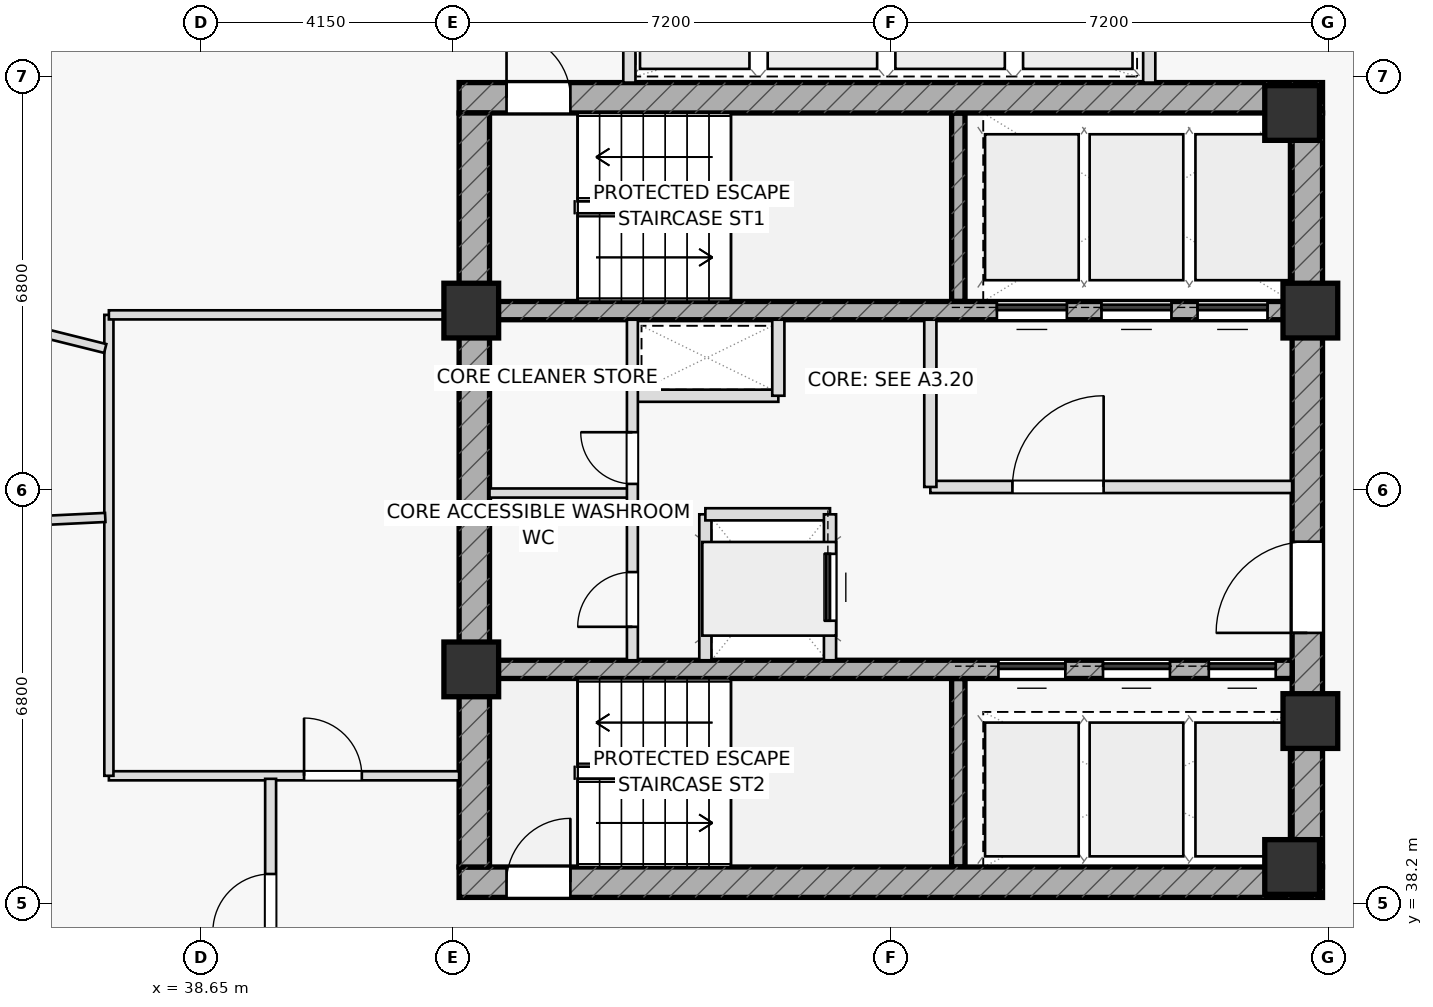
"""IFC4 building model, lengths in metres.
Left out: names, types, materials, properties, quantities, classifications, styles, units other than length and angle.
Written with IfcOpenShell. Run it as: python <this file> out.ifc"""

import sys

from ifc_helpers import new_model, si_unit, direction, frame, frame_2d, origin, origin_2d, place, context, subcontext, project, spatial, rectangle, extrude, element, fill, save


model = new_model("IFC4")
c1 = context("Model", 3, precision=1e-05, world=origin(), true_north=direction((0.0, 1.0)))
c2 = subcontext(c1, "Body", "Model", "MODEL_VIEW")
j1 = project(units=[si_unit("LENGTHUNIT", "METRE"), si_unit("PLANEANGLEUNIT", "RADIAN")], contexts=[c1])
p1 = place(None, origin())
s1 = spatial("IfcSite", under=j1, at=p1, CompositionType="ELEMENT")
p2 = place(p1, origin())
s2 = spatial("IfcBuilding", under=s1, at=p2, CompositionType="ELEMENT")
p3 = place(p2, frame((0.0, 0.0, 216.95)))
s3 = spatial("IfcBuildingStorey", under=s2, at=p3, CompositionType="ELEMENT", Elevation=216.95)
for number, where, z_axis, x_axis in (
    (1, (51.11, 48.1, 0.0), (0.0, 0.0, 1.0), (0.0, 1.0, 0.0)),
    (2, (51.11, 38.8, 0.0), (0.0, 0.0, 1.0), (0.0, 1.0, 0.0)),
):
    element("IfcWall", number, at=place(p3, frame(where, z_axis=z_axis, x_axis=x_axis)), inside=s3, PredefinedType="SHEAR", context=c2, shape_type="SweptSolid", body=[
        extrude(rectangle(XDim=3.1, YDim=0.22, at=frame_2d((1.55, 0.0))), origin(), (0.0, 0.0, 1.0), 4.9),
    ])
p4 = place(p3, frame((42.9, 51.45, 0.0), z_axis=(0.0, 0.0, 1.0), x_axis=(1.0, 0.0, 0.0)))
e3 = element("IfcWall", 3, at=p4, inside=s3, PredefinedType="SHEAR", context=c2, shape_type="SweptSolid", body=[
    extrude(rectangle(XDim=14.2, YDim=0.5, at=frame_2d((7.1, 0.0))), origin(), (0.0, 0.0, 1.0), 4.9),
])
p5 = place(p4, frame((0.78, 0.0, 0.0)))
e4 = element("IfcOpeningElement", 4, at=p5, cuts=e3, PredefinedType="OPENING", context=c2, shape_type="SweptSolid", body=[
    extrude(rectangle(XDim=1.05, YDim=2.2, at=frame_2d((0.525, 1.1))), frame((0.0, 0.26, 0.0), z_axis=(0.0, -1.0, 0.0), x_axis=(1.0, 0.0, 0.0)), (0.0, 0.0, 1.0), 0.52),
])
p6 = place(p3, frame((42.9, 38.55, 0.0), z_axis=(0.0, 0.0, 1.0), x_axis=(1.0, 0.0, 0.0)))
e5 = element("IfcWall", 5, at=p6, inside=s3, PredefinedType="SHEAR", context=c2, shape_type="SweptSolid", body=[
    extrude(rectangle(XDim=14.2, YDim=0.5, at=frame_2d((7.1, 0.0))), origin(), (0.0, 0.0, 1.0), 4.9),
])
p7 = place(p6, frame((0.78, 0.0, 0.0)))
e6 = element("IfcOpeningElement", 6, at=p7, cuts=e5, PredefinedType="OPENING", context=c2, shape_type="SweptSolid", body=[
    extrude(rectangle(XDim=1.05, YDim=2.2, at=frame_2d((0.525, 1.1))), frame((0.0, 0.26, 0.0), z_axis=(0.0, -1.0, 0.0), x_axis=(1.0, 0.0, 0.0)), (0.0, 0.0, 1.0), 0.52),
])
p8 = place(p3, frame((43.15, 38.8, 0.0), z_axis=(0.0, 0.0, 1.0), x_axis=(0.0, 1.0, 0.0)))
e7 = element("IfcWall", 7, at=p8, inside=s3, PredefinedType="SHEAR", context=c2, shape_type="SweptSolid", body=[
    extrude(rectangle(XDim=12.4, YDim=0.5, at=frame_2d((6.2, 0.0))), origin(), (0.0, 0.0, 1.0), 4.9),
])
p9 = place(p3, frame((56.85, 38.8, 0.0), z_axis=(0.0, 0.0, 1.0), x_axis=(0.0, 1.0, 0.0)))
e8 = element("IfcWall", 8, at=p9, inside=s3, PredefinedType="SHEAR", context=c2, shape_type="SweptSolid", body=[
    extrude(rectangle(XDim=12.4, YDim=0.5, at=frame_2d((6.2, 0.0))), origin(), (0.0, 0.0, 1.0), 4.9),
])
p10 = place(p9, frame((3.85, 0.0, 0.0)))
e9 = element("IfcOpeningElement", 9, at=p10, cuts=e8, PredefinedType="OPENING", context=c2, shape_type="SweptSolid", body=[
    extrude(rectangle(XDim=1.5, YDim=2.2, at=frame_2d((0.75, 1.1))), frame((0.0, 0.26, 0.0), z_axis=(0.0, -1.0, 0.0), x_axis=(1.0, 0.0, 0.0)), (0.0, 0.0, 1.0), 0.52),
])
p11 = place(p3, frame((43.4, 47.95, 0.0), z_axis=(0.0, 0.0, 1.0), x_axis=(1.0, 0.0, 0.0)))
e10 = element("IfcWall", 10, at=p11, inside=s3, PredefinedType="SHEAR", context=c2, shape_type="SweptSolid", body=[
    extrude(rectangle(XDim=13.2, YDim=0.3, at=frame_2d((6.6, 0.0))), origin(), (0.0, 0.0, 1.0), 4.9),
])
p12 = place(p11, frame((8.345, 0.0, 0.0)))
e11 = element("IfcOpeningElement", 11, at=p12, cuts=e10, PredefinedType="OPENING", context=c2, shape_type="SweptSolid", body=[
    extrude(rectangle(XDim=1.15, YDim=2.2, at=frame_2d((0.575, 1.1))), frame((0.0, 0.16, 0.0), z_axis=(0.0, -1.0, 0.0), x_axis=(1.0, 0.0, 0.0)), (0.0, 0.0, 1.0), 0.32),
])
p13 = place(p11, frame((10.065, 0.0, 0.0)))
e12 = element("IfcOpeningElement", 12, at=p13, cuts=e10, PredefinedType="OPENING", context=c2, shape_type="SweptSolid", body=[
    extrude(rectangle(XDim=1.15, YDim=2.2, at=frame_2d((0.575, 1.1))), frame((0.0, 0.16, 0.0), z_axis=(0.0, -1.0, 0.0), x_axis=(1.0, 0.0, 0.0)), (0.0, 0.0, 1.0), 0.32),
])
p14 = place(p11, frame((11.645, 0.0, 0.0)))
e13 = element("IfcOpeningElement", 13, at=p14, cuts=e10, PredefinedType="OPENING", context=c2, shape_type="SweptSolid", body=[
    extrude(rectangle(XDim=1.15, YDim=2.2, at=frame_2d((0.575, 1.1))), frame((0.0, 0.16, 0.0), z_axis=(0.0, -1.0, 0.0), x_axis=(1.0, 0.0, 0.0)), (0.0, 0.0, 1.0), 0.32),
])
p15 = place(p3, frame((43.4, 42.05, 0.0), z_axis=(0.0, 0.0, 1.0), x_axis=(1.0, 0.0, 0.0)))
e14 = element("IfcWall", 14, at=p15, inside=s3, PredefinedType="SHEAR", context=c2, shape_type="SweptSolid", body=[
    extrude(rectangle(XDim=13.2, YDim=0.3, at=frame_2d((6.6, 0.0))), origin(), (0.0, 0.0, 1.0), 4.9),
])
p16 = place(p15, frame((8.37, 0.0, 0.0)))
e15 = element("IfcOpeningElement", 15, at=p16, cuts=e14, PredefinedType="OPENING", context=c2, shape_type="SweptSolid", body=[
    extrude(rectangle(XDim=1.1, YDim=2.15, at=frame_2d((0.55, 1.075))), frame((0.0, 0.16, 0.0), z_axis=(0.0, -1.0, 0.0), x_axis=(1.0, 0.0, 0.0)), (0.0, 0.0, 1.0), 0.32),
])
p17 = place(p15, frame((10.09, 0.0, 0.0)))
e16 = element("IfcOpeningElement", 16, at=p17, cuts=e14, PredefinedType="OPENING", context=c2, shape_type="SweptSolid", body=[
    extrude(rectangle(XDim=1.1, YDim=2.15, at=frame_2d((0.55, 1.075))), frame((0.0, 0.16, 0.0), z_axis=(0.0, -1.0, 0.0), x_axis=(1.0, 0.0, 0.0)), (0.0, 0.0, 1.0), 0.32),
])
p18 = place(p15, frame((11.83, 0.0, 0.0)))
e17 = element("IfcOpeningElement", 17, at=p18, cuts=e14, PredefinedType="OPENING", context=c2, shape_type="SweptSolid", body=[
    extrude(rectangle(XDim=1.1, YDim=2.15, at=frame_2d((0.55, 1.075))), frame((0.0, 0.16, 0.0), z_axis=(0.0, -1.0, 0.0), x_axis=(1.0, 0.0, 0.0)), (0.0, 0.0, 1.0), 0.32),
])
for number, where, z_axis, x_axis in (
    (18, (43.1, 47.95, 0.0), (0.0, 0.0, 1.0), (1.0, 0.0, 0.0)),
    (19, (56.9, 47.95, 0.0), (0.0, 0.0, 1.0), (1.0, 0.0, 0.0)),
    (20, (56.6, 51.2, 0.0), (0.0, 0.0, 1.0), (1.0, 0.0, 0.0)),
    (21, (43.1, 42.05, 0.0), (0.0, 0.0, 1.0), (1.0, 0.0, 0.0)),
    (22, (56.9, 41.2, 0.0), (0.0, 0.0, 1.0), (1.0, 0.0, 0.0)),
    (23, (56.6, 38.8, 0.0), (0.0, 0.0, 1.0), (1.0, 0.0, 0.0)),
):
    element("IfcColumn", number, at=place(p3, frame(where, z_axis=z_axis, x_axis=x_axis)), inside=s3, PredefinedType="COLUMN", context=c2, shape_type="SweptSolid", body=[
        extrude(rectangle(XDim=0.9, YDim=0.9, at=origin_2d()), origin(), (0.0, 0.0, 1.0), 4.9),
    ])
for number, where, z_axis, x_axis in (
    (24, (45.7, 51.7, 0.0), (0.0, 0.0, 1.0), (0.0, 1.0, 0.0)),
    (25, (54.25, 51.7, 0.0), (0.0, 0.0, 1.0), (0.0, 1.0, 0.0)),
):
    element("IfcWall", number, at=place(p3, frame(where, z_axis=z_axis, x_axis=x_axis)), inside=s3, PredefinedType="PARTITIONING", context=c2, shape_type="SweptSolid", body=[
        extrude(rectangle(XDim=2.6, YDim=0.2, at=frame_2d((1.3, 0.0))), origin(), (0.0, 0.0, 1.0), 4.9),
    ])
p19 = place(p3, frame((45.75, 46.55, 0.0), z_axis=(0.0, 0.0, 1.0), x_axis=(1.0, 0.0, 0.0)))
e26 = element("IfcWall", 26, at=p19, inside=s3, PredefinedType="PARTITIONING", context=c2, shape_type="SweptSolid", body=[
    extrude(rectangle(XDim=2.4, YDim=0.2, at=frame_2d((1.2, 0.0))), origin(), (0.0, 0.0, 1.0), 4.9),
])
p20 = place(p3, frame((48.15, 46.55, 0.0), z_axis=(0.0, 0.0, 1.0), x_axis=(0.0, 1.0, 0.0)))
e27 = element("IfcWall", 27, at=p20, inside=s3, PredefinedType="PARTITIONING", context=c2, shape_type="SweptSolid", body=[
    extrude(rectangle(XDim=1.25, YDim=0.2, at=frame_2d((0.625, 0.0))), origin(), (0.0, 0.0, 1.0), 4.9),
])
p21 = place(p3, frame((46.95, 42.2, 0.0), z_axis=(0.0, 0.0, 1.0), x_axis=(0.0, 1.0, 0.0)))
e28 = element("IfcWall", 28, at=p21, inside=s3, PredefinedType="PARTITIONING", context=c2, shape_type="SweptSolid", body=[
    extrude(rectangle(XDim=2.4, YDim=0.2, at=frame_2d((1.2, 0.0))), origin(), (0.0, 0.0, 1.0), 4.9),
])
p22 = place(p3, frame((46.95, 44.6, 0.0), z_axis=(0.0, 0.0, 1.0), x_axis=(1.0, 0.0, 0.0)))
e29 = element("IfcWall", 29, at=p22, inside=s3, PredefinedType="PARTITIONING", context=c2, shape_type="SweptSolid", body=[
    extrude(rectangle(XDim=2.05, YDim=0.2, at=frame_2d((1.025, 0.0))), origin(), (0.0, 0.0, 1.0), 4.9),
])
p23 = place(p3, frame((50.65, 45.05, 0.0), z_axis=(0.0, 0.0, 1.0), x_axis=(1.0, 0.0, 0.0)))
e30 = element("IfcWall", 30, at=p23, inside=s3, PredefinedType="PARTITIONING", context=c2, shape_type="SweptSolid", body=[
    extrude(rectangle(XDim=5.95, YDim=0.2, at=frame_2d((2.975, 0.0))), origin(), (0.0, 0.0, 1.0), 4.9),
])
p24 = place(p23, frame((1.35, 0.0, 0.0)))
e31 = element("IfcOpeningElement", 31, at=p24, cuts=e30, PredefinedType="OPENING", context=c2, shape_type="SweptSolid", body=[
    extrude(rectangle(XDim=1.5, YDim=2.2, at=frame_2d((0.75, 1.1))), frame((0.0, 0.11, 0.0), z_axis=(0.0, -1.0, 0.0), x_axis=(1.0, 0.0, 0.0)), (0.0, 0.0, 1.0), 0.22),
])
p25 = place(p3, frame((50.65, 45.05, 0.0), z_axis=(0.0, 0.0, 1.0), x_axis=(0.0, 1.0, 0.0)))
e32 = element("IfcWall", 32, at=p25, inside=s3, PredefinedType="PARTITIONING", context=c2, shape_type="SweptSolid", body=[
    extrude(rectangle(XDim=2.75, YDim=0.2, at=frame_2d((1.375, 0.0))), origin(), (0.0, 0.0, 1.0), 4.9),
])
p26 = place(p3, frame((43.4, 44.95, 0.0), z_axis=(0.0, 0.0, 1.0), x_axis=(1.0, 0.0, 0.0)))
e33 = element("IfcWall", 33, at=p26, inside=s3, PredefinedType="PARTITIONING", context=c2, shape_type="SweptSolid", body=[
    extrude(rectangle(XDim=2.35, YDim=0.15, at=frame_2d((1.175, 0.0))), origin(), (0.0, 0.0, 1.0), 4.9),
])
p27 = place(p3, frame((45.75, 42.2, 0.0), z_axis=(0.0, 0.0, 1.0), x_axis=(0.0, 1.0, 0.0)))
e34 = element("IfcWall", 34, at=p27, inside=s3, PredefinedType="PARTITIONING", context=c2, shape_type="SweptSolid", body=[
    extrude(rectangle(XDim=5.6, YDim=0.18, at=frame_2d((2.8, 0.0))), origin(), (0.0, 0.0, 1.0), 4.9),
])
p28 = place(p27, frame((0.55, 0.0, 0.0)))
e35 = element("IfcOpeningElement", 35, at=p28, cuts=e34, PredefinedType="OPENING", context=c2, shape_type="SweptSolid", body=[
    extrude(rectangle(XDim=0.9, YDim=2.05, at=frame_2d((0.45, 1.025))), frame((0.0, 0.1, 0.0), z_axis=(0.0, -1.0, 0.0), x_axis=(1.0, 0.0, 0.0)), (0.0, 0.0, 1.0), 0.2),
])
p29 = place(p27, frame((2.9, 0.0, 0.0)))
e36 = element("IfcOpeningElement", 36, at=p29, cuts=e34, PredefinedType="OPENING", context=c2, shape_type="SweptSolid", body=[
    extrude(rectangle(XDim=0.85, YDim=2.05, at=frame_2d((0.425, 1.025))), frame((0.0, 0.1, 0.0), z_axis=(0.0, -1.0, 0.0), x_axis=(1.0, 0.0, 0.0)), (0.0, 0.0, 1.0), 0.2),
])
p30 = place(p3, frame((37.14, 40.3, 0.0), z_axis=(0.0, 0.0, 1.0), x_axis=(1.0, 0.0, 0.0)))
e37 = element("IfcWall", 37, at=p30, inside=s3, PredefinedType="PARTITIONING", context=c2, shape_type="SweptSolid", body=[
    extrude(rectangle(XDim=5.76, YDim=0.15, at=frame_2d((2.88, 0.0))), origin(), (0.0, 0.0, 1.0), 4.275),
])
p31 = place(p30, frame((3.21, 0.0, 0.0)))
e38 = element("IfcOpeningElement", 38, at=p31, cuts=e37, PredefinedType="OPENING", context=c2, shape_type="SweptSolid", body=[
    extrude(rectangle(XDim=0.95, YDim=2.05, at=frame_2d((0.475, 1.025))), frame((0.0, 0.085, 0.0), z_axis=(0.0, -1.0, 0.0), x_axis=(1.0, 0.0, 0.0)), (0.0, 0.0, 1.0), 0.17),
])
p32 = place(p3, frame((37.14, 40.3, 0.0), z_axis=(0.0, 0.0, 1.0), x_axis=(0.0, 1.0, 0.0)))
e39 = element("IfcWall", 39, at=p32, inside=s3, PredefinedType="PARTITIONING", context=c2, shape_type="SweptSolid", body=[
    extrude(rectangle(XDim=7.58, YDim=0.15, at=frame_2d((3.79, 0.0))), origin(), (0.0, 0.0, 1.0), 4.9),
])
p33 = place(p3, frame((37.14, 47.88, 0.0), z_axis=(0.0, 0.0, 1.0), x_axis=(1.0, 0.0, 0.0)))
e40 = element("IfcWall", 40, at=p33, inside=s3, PredefinedType="PARTITIONING", context=c2, shape_type="SweptSolid", body=[
    extrude(rectangle(XDim=5.76, YDim=0.15, at=frame_2d((2.88, 0.0))), origin(), (0.0, 0.0, 1.0), 4.275),
])
p34 = place(p3, frame((37.08, 47.327, 0.0), z_axis=(0.0, 0.0, 1.0), x_axis=(-0.970214185524, 0.242248703214, 0.0)))
e41 = element("IfcWall", 41, at=p34, inside=s3, PredefinedType="PARTITIONING", context=c2, shape_type="SweptSolid", body=[
    extrude(rectangle(XDim=11.412, YDim=0.15, at=frame_2d((5.706, 0.0))), origin(), (0.0, 0.0, 1.0), 4.385),
])
p35 = place(p3, frame((37.08, 44.549, 0.0), z_axis=(0.0, 0.0, 1.0), x_axis=(-0.998828037423, -0.048399913813, 0.0)))
e42 = element("IfcWall", 42, at=p35, inside=s3, PredefinedType="PARTITIONING", context=c2, shape_type="SweptSolid", body=[
    extrude(rectangle(XDim=10.421, YDim=0.15, at=frame_2d((5.211, 0.0))), origin(), (0.0, 0.0, 1.0), 4.385),
])
p36 = place(p35, frame((3.15, 0.0, 0.0)))
e43 = element("IfcOpeningElement", 43, at=p36, cuts=e42, PredefinedType="OPENING", context=c2, shape_type="SweptSolid", body=[
    extrude(rectangle(XDim=0.95, YDim=2.05, at=frame_2d((0.475, 1.025))), frame((0.0, 0.085, 0.0), z_axis=(0.0, -1.0, 0.0), x_axis=(1.0, 0.0, 0.0)), (0.0, 0.0, 1.0), 0.17),
])
p37 = place(p3, frame((39.8, 36.17, 0.0), z_axis=(0.0, 0.0, 1.0), x_axis=(0.0, 1.0, 0.0)))
e44 = element("IfcWall", 44, at=p37, inside=s3, PredefinedType="PARTITIONING", context=c2, shape_type="SweptSolid", body=[
    extrude(rectangle(XDim=4.08, YDim=0.18, at=frame_2d((2.04, 0.0))), origin(), (0.0, 0.0, 1.0), 4.575),
])
p38 = place(p37, frame((1.565, 0.0, 0.0)))
e45 = element("IfcOpeningElement", 45, at=p38, cuts=e44, PredefinedType="OPENING", context=c2, shape_type="SweptSolid", body=[
    extrude(rectangle(XDim=0.95, YDim=2.05, at=frame_2d((0.475, 1.025))), frame((0.0, 0.1, 0.0), z_axis=(0.0, -1.0, 0.0), x_axis=(1.0, 0.0, 0.0)), (0.0, 0.0, 1.0), 0.2),
])
p39 = place(p3, frame((49.0, 42.2, 0.0), z_axis=(0.0, 0.0, 1.0), x_axis=(0.0, 1.0, 0.0)))
e46 = element("IfcWall", 46, at=p39, inside=s3, PredefinedType="PARTITIONING", context=c2, shape_type="SweptSolid", body=[
    extrude(rectangle(XDim=2.4, YDim=0.2, at=frame_2d((1.2, 0.0))), origin(), (0.0, 0.0, 1.0), 4.9),
])
p40 = place(p39, frame((0.65, 0.0, 0.0)))
e47 = element("IfcOpeningElement", 47, at=p40, cuts=e46, PredefinedType="OPENING", context=c2, shape_type="SweptSolid", body=[
    extrude(rectangle(XDim=1.1, YDim=2.15, at=frame_2d((0.55, 1.075))), frame((0.0, 0.11, 0.0), z_axis=(0.0, -1.0, 0.0), x_axis=(1.0, 0.0, 0.0)), (0.0, 0.0, 1.0), 0.22),
])
p41 = place(p5, origin())
e48 = element("IfcDoor", 48, at=p41, inside=s3, OperationType="SINGLE_SWING_LEFT", PredefinedType="DOOR", context=c2, shape_type="SweptSolid", body=[
    extrude(rectangle(XDim=1.05, YDim=2.2, at=frame_2d((0.525, 1.1))), frame((0.0, 0.025, 0.0), z_axis=(0.0, -1.0, 0.0), x_axis=(1.0, 0.0, 0.0)), (0.0, 0.0, 1.0), 0.05),
])
fill(e4, e48)
p42 = place(p7, origin())
e49 = element("IfcDoor", 49, at=p42, inside=s3, OperationType="SINGLE_SWING_RIGHT", PredefinedType="DOOR", context=c2, shape_type="SweptSolid", body=[
    extrude(rectangle(XDim=1.05, YDim=2.2, at=frame_2d((0.525, 1.1))), frame((0.0, 0.025, 0.0), z_axis=(0.0, -1.0, 0.0), x_axis=(1.0, 0.0, 0.0)), (0.0, 0.0, 1.0), 0.05),
])
fill(e6, e49)
p43 = place(p10, origin())
e50 = element("IfcDoor", 50, at=p43, inside=s3, OperationType="SINGLE_SWING_LEFT", PredefinedType="DOOR", context=c2, shape_type="SweptSolid", body=[
    extrude(rectangle(XDim=1.5, YDim=2.2, at=frame_2d((0.75, 1.1))), frame((0.0, 0.025, 0.0), z_axis=(0.0, -1.0, 0.0), x_axis=(1.0, 0.0, 0.0)), (0.0, 0.0, 1.0), 0.05),
])
fill(e9, e50)
p44 = place(p24, origin())
e51 = element("IfcDoor", 51, at=p44, inside=s3, OperationType="SINGLE_SWING_RIGHT", PredefinedType="DOOR", context=c2, shape_type="SweptSolid", body=[
    extrude(rectangle(XDim=1.5, YDim=2.2, at=frame_2d((0.75, 1.1))), frame((0.0, 0.025, 0.0), z_axis=(0.0, -1.0, 0.0), x_axis=(1.0, 0.0, 0.0)), (0.0, 0.0, 1.0), 0.05),
])
fill(e31, e51)
p45 = place(p28, origin())
e52 = element("IfcDoor", 52, at=p45, inside=s3, OperationType="SINGLE_SWING_LEFT", PredefinedType="DOOR", context=c2, shape_type="SweptSolid", body=[
    extrude(rectangle(XDim=0.9, YDim=2.05, at=frame_2d((0.45, 1.025))), frame((0.0, 0.025, 0.0), z_axis=(0.0, -1.0, 0.0), x_axis=(1.0, 0.0, 0.0)), (0.0, 0.0, 1.0), 0.05),
])
fill(e35, e52)
p46 = place(p29, origin())
e53 = element("IfcDoor", 53, at=p46, inside=s3, OperationType="SINGLE_SWING_RIGHT", PredefinedType="DOOR", context=c2, shape_type="SweptSolid", body=[
    extrude(rectangle(XDim=0.85, YDim=2.05, at=frame_2d((0.425, 1.025))), frame((0.0, 0.025, 0.0), z_axis=(0.0, -1.0, 0.0), x_axis=(1.0, 0.0, 0.0)), (0.0, 0.0, 1.0), 0.05),
])
fill(e36, e53)
p47 = place(p31, origin())
e54 = element("IfcDoor", 54, at=p47, inside=s3, OperationType="SINGLE_SWING_LEFT", PredefinedType="DOOR", context=c2, shape_type="SweptSolid", body=[
    extrude(rectangle(XDim=0.95, YDim=2.05, at=frame_2d((0.475, 1.025))), frame((0.0, 0.025, 0.0), z_axis=(0.0, -1.0, 0.0), x_axis=(1.0, 0.0, 0.0)), (0.0, 0.0, 1.0), 0.05),
])
fill(e38, e54)
p48 = place(p38, origin())
e55 = element("IfcDoor", 55, at=p48, inside=s3, OperationType="SINGLE_SWING_LEFT", PredefinedType="DOOR", context=c2, shape_type="SweptSolid", body=[
    extrude(rectangle(XDim=0.95, YDim=2.05, at=frame_2d((0.475, 1.025))), frame((0.0, 0.025, 0.0), z_axis=(0.0, -1.0, 0.0), x_axis=(1.0, 0.0, 0.0)), (0.0, 0.0, 1.0), 0.05),
])
fill(e45, e55)
p49 = place(p12, origin())
e56 = element("IfcDoor", 56, at=p49, inside=s3, OperationType="SLIDING_TO_LEFT", PredefinedType="DOOR", context=c2, shape_type="SweptSolid", body=[
    extrude(rectangle(XDim=1.15, YDim=2.2, at=frame_2d((0.575, 1.1))), frame((0.0, 0.025, 0.0), z_axis=(0.0, -1.0, 0.0), x_axis=(1.0, 0.0, 0.0)), (0.0, 0.0, 1.0), 0.05),
])
fill(e11, e56)
p50 = place(p13, origin())
e57 = element("IfcDoor", 57, at=p50, inside=s3, OperationType="SLIDING_TO_LEFT", PredefinedType="DOOR", context=c2, shape_type="SweptSolid", body=[
    extrude(rectangle(XDim=1.15, YDim=2.2, at=frame_2d((0.575, 1.1))), frame((0.0, 0.025, 0.0), z_axis=(0.0, -1.0, 0.0), x_axis=(1.0, 0.0, 0.0)), (0.0, 0.0, 1.0), 0.05),
])
fill(e12, e57)
p51 = place(p14, origin())
e58 = element("IfcDoor", 58, at=p51, inside=s3, OperationType="SLIDING_TO_LEFT", PredefinedType="DOOR", context=c2, shape_type="SweptSolid", body=[
    extrude(rectangle(XDim=1.15, YDim=2.2, at=frame_2d((0.575, 1.1))), frame((0.0, 0.025, 0.0), z_axis=(0.0, -1.0, 0.0), x_axis=(1.0, 0.0, 0.0)), (0.0, 0.0, 1.0), 0.05),
])
fill(e13, e58)
p52 = place(p16, origin())
e59 = element("IfcDoor", 59, at=p52, inside=s3, OperationType="SLIDING_TO_LEFT", PredefinedType="DOOR", context=c2, shape_type="SweptSolid", body=[
    extrude(rectangle(XDim=1.1, YDim=2.15, at=frame_2d((0.55, 1.075))), frame((0.0, 0.025, 0.0), z_axis=(0.0, -1.0, 0.0), x_axis=(1.0, 0.0, 0.0)), (0.0, 0.0, 1.0), 0.05),
])
fill(e15, e59)
p53 = place(p17, origin())
e60 = element("IfcDoor", 60, at=p53, inside=s3, OperationType="SLIDING_TO_LEFT", PredefinedType="DOOR", context=c2, shape_type="SweptSolid", body=[
    extrude(rectangle(XDim=1.1, YDim=2.15, at=frame_2d((0.55, 1.075))), frame((0.0, 0.025, 0.0), z_axis=(0.0, -1.0, 0.0), x_axis=(1.0, 0.0, 0.0)), (0.0, 0.0, 1.0), 0.05),
])
fill(e16, e60)
p54 = place(p18, origin())
e61 = element("IfcDoor", 61, at=p54, inside=s3, OperationType="SLIDING_TO_LEFT", PredefinedType="DOOR", context=c2, shape_type="SweptSolid", body=[
    extrude(rectangle(XDim=1.1, YDim=2.15, at=frame_2d((0.55, 1.075))), frame((0.0, 0.025, 0.0), z_axis=(0.0, -1.0, 0.0), x_axis=(1.0, 0.0, 0.0)), (0.0, 0.0, 1.0), 0.05),
])
fill(e17, e61)
p55 = place(p40, origin())
e62 = element("IfcDoor", 62, at=p55, inside=s3, OperationType="SLIDING_TO_RIGHT", PredefinedType="DOOR", context=c2, shape_type="SweptSolid", body=[
    extrude(rectangle(XDim=1.1, YDim=2.15, at=frame_2d((0.55, 1.075))), frame((0.0, 0.025, 0.0), z_axis=(0.0, -1.0, 0.0), x_axis=(1.0, 0.0, 0.0)), (0.0, 0.0, 1.0), 0.05),
])
fill(e47, e62)
save(model, sys.argv[1])
